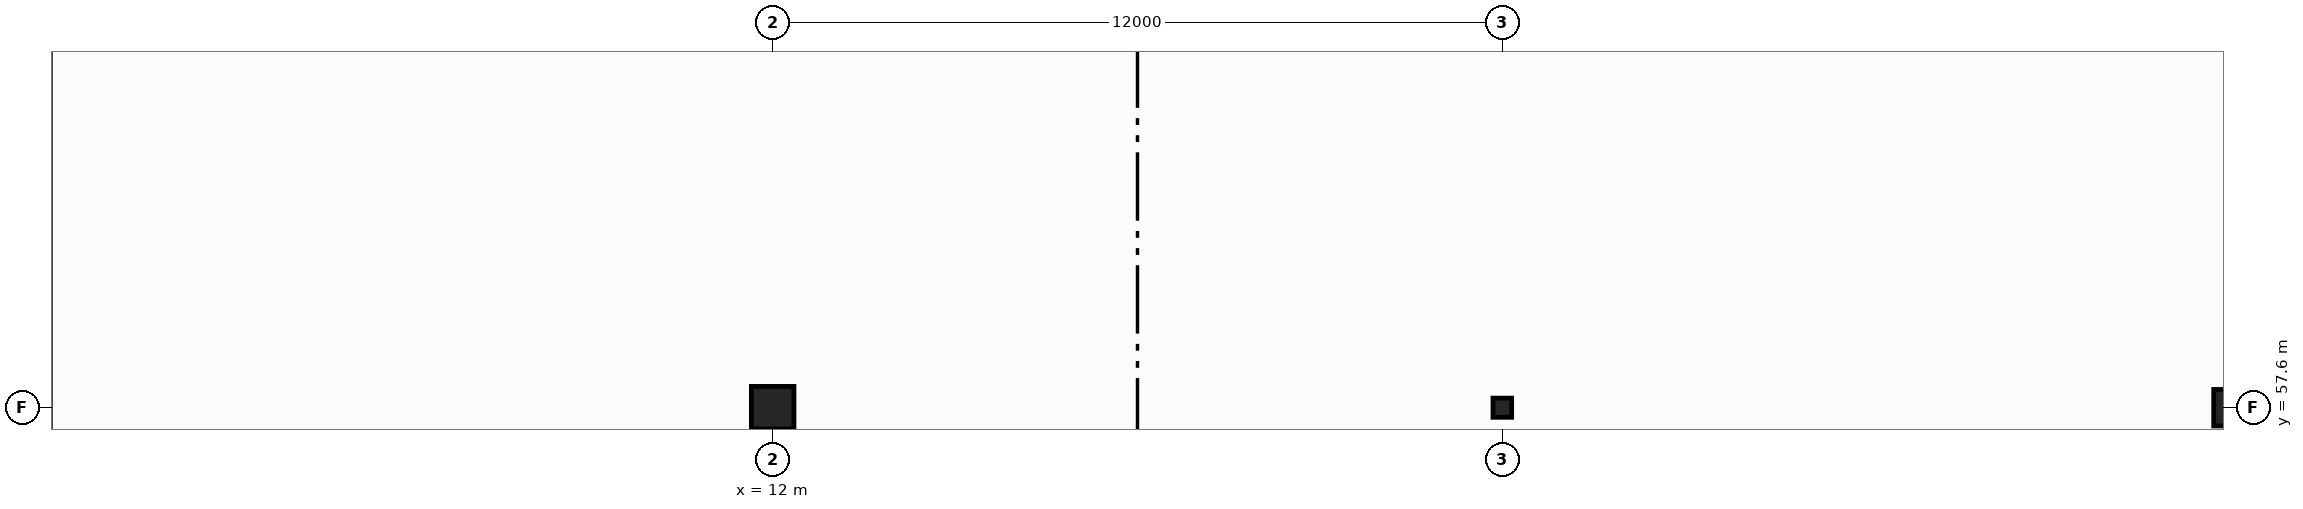
"""IFC4 building model, lengths in metres.
Left out: names, types, materials, properties, quantities, classifications, styles, units other than length and angle.
Written with IfcOpenShell. Run it as: python <this file> out.ifc"""

import sys

from ifc_helpers import new_model, si_unit, direction, frame, origin, origin_2d, place, context, subcontext, project, spatial, rectangle, i_section, extrude, element, save


model = new_model("IFC4")
c1 = context("Model", 3, precision=1e-05, world=origin(), true_north=direction((0.0, 1.0)))
c2 = subcontext(c1, "Body", "Model", "MODEL_VIEW")
j1 = project(units=[si_unit("LENGTHUNIT", "METRE"), si_unit("PLANEANGLEUNIT", "RADIAN")], contexts=[c1])
p1 = place(None, origin())
s1 = spatial("IfcSite", under=j1, at=p1, CompositionType="ELEMENT")
p2 = place(p1, origin())
s2 = spatial("IfcBuilding", under=s1, at=p2, CompositionType="ELEMENT")
p3 = place(p2, frame((0.0, 0.0, -4.8)))
s3 = spatial("IfcBuildingStorey", under=s2, at=p3, CompositionType="ELEMENT", Elevation=-4.8)
p4 = place(p3, frame((12.0, 57.6, 0.0), z_axis=(0.0, 0.0, 1.0), x_axis=(0.0, 1.0, 0.0)))
e1 = element("IfcColumn", 1, at=p4, inside=s3, PredefinedType="COLUMN", context=c2, shape_type="SweptSolid", body=[
    extrude(rectangle(XDim=0.7, YDim=0.7, at=origin_2d()), origin(), (0.0, 0.0, 1.0), 4.8),
])
p5 = place(p3, frame((24.0, 57.6, 0.0), z_axis=(0.0, 0.0, 1.0), x_axis=(1.0, 0.0, 0.0)))
e2 = element("IfcColumn", 2, at=p5, inside=s3, PredefinedType="COLUMN", context=c2, shape_type="SweptSolid", body=[
    extrude(i_section(OverallWidth=0.307, OverallDepth=0.315, WebThickness=0.012, FlangeThickness=0.019, at=origin_2d()), origin(), (0.0, 0.0, 1.0), 4.8),
])
p6 = place(p3, frame((36.0, 57.6, 0.0), z_axis=(0.0, 0.0, 1.0), x_axis=(0.0, 1.0, 0.0)))
e3 = element("IfcColumn", 3, at=p6, inside=s3, PredefinedType="COLUMN", context=c2, shape_type="SweptSolid", body=[
    extrude(rectangle(XDim=0.6, YDim=0.6, at=origin_2d()), origin(), (0.0, 0.0, 1.0), 4.8),
])
save(model, sys.argv[1])
